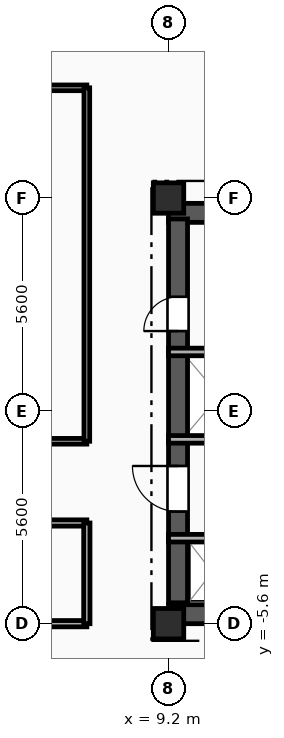
"""IFC4 building model, lengths in metres.
Left out: names, types, materials, properties, quantities, classifications, styles, units other than length and angle.
Written with IfcOpenShell. Run it as: python <this file> out.ifc"""

import sys

from ifc_helpers import new_model, si_unit, direction, frame, frame_2d, origin, origin_2d, place, context, subcontext, project, spatial, rectangle, extrude, element, fill, save


model = new_model("IFC4")
c1 = context("Model", 3, precision=1e-05, world=origin(), true_north=direction((0.0, 1.0)))
c2 = subcontext(c1, "Body", "Model", "MODEL_VIEW")
j1 = project(units=[si_unit("LENGTHUNIT", "METRE"), si_unit("PLANEANGLEUNIT", "RADIAN")], contexts=[c1])
p1 = place(None, origin())
s1 = spatial("IfcSite", under=j1, at=p1, CompositionType="ELEMENT")
p2 = place(p1, origin())
s2 = spatial("IfcBuilding", under=s1, at=p2, CompositionType="ELEMENT")
p3 = place(p2, frame((0.0, 0.0, 209.8)))
s3 = spatial("IfcBuildingStorey", under=s2, at=p3, CompositionType="ELEMENT", Elevation=209.8)
for number, where, z_axis, x_axis in (
    (1, (9.2, -5.6, 0.0), (0.0, 0.0, 1.0), (1.0, 0.0, 0.0)),
    (2, (9.2, 5.6, 0.0), (0.0, 0.0, 1.0), (1.0, 0.0, 0.0)),
):
    element("IfcColumn", number, at=place(p3, frame(where, z_axis=z_axis, x_axis=x_axis)), inside=s3, PredefinedType="COLUMN", context=c2, shape_type="SweptSolid", body=[
        extrude(rectangle(XDim=0.8, YDim=0.8, at=origin_2d()), origin(), (0.0, 0.0, 1.0), 3.35),
    ])
p4 = place(p3, frame((9.2, 5.21, 0.0), z_axis=(0.0, 0.0, 1.0), x_axis=(1.0, 0.0, 0.0)))
e3 = element("IfcWall", 3, at=p4, inside=s3, PredefinedType="SHEAR", context=c2, shape_type="SweptSolid", body=[
    extrude(rectangle(XDim=9.6, YDim=0.5, at=frame_2d((4.8, 0.0))), origin(), (0.0, 0.0, 1.0), 3.04),
])
p5 = place(p4, frame((6.95, 0.0, 0.0)))
e4 = element("IfcOpeningElement", 4, at=p5, cuts=e3, PredefinedType="OPENING", context=c2, shape_type="SweptSolid", body=[
    extrude(rectangle(XDim=1.1, YDim=2.15, at=frame_2d((0.55, 1.075))), frame((0.0, 0.26, 0.0), z_axis=(0.0, -1.0, 0.0), x_axis=(1.0, 0.0, 0.0)), (0.0, 0.0, 1.0), 0.52),
])
p6 = place(p4, frame((3.775, 0.0, 0.0)))
e5 = element("IfcOpeningElement", 5, at=p6, cuts=e3, PredefinedType="OPENING", context=c2, shape_type="SweptSolid", body=[
    extrude(rectangle(XDim=1.05, YDim=2.1, at=frame_2d((0.525, 1.05))), frame((0.0, 0.26, 0.0), z_axis=(0.0, -1.0, 0.0), x_axis=(1.0, 0.0, 0.0)), (0.0, 0.0, 1.0), 0.52),
])
p7 = place(p3, frame((9.2, -5.35, 0.0), z_axis=(0.0, 0.0, 1.0), x_axis=(1.0, 0.0, 0.0)))
e6 = element("IfcWall", 6, at=p7, inside=s3, PredefinedType="SHEAR", context=c2, shape_type="SweptSolid", body=[
    extrude(rectangle(XDim=9.6, YDim=0.5, at=frame_2d((4.8, 0.0))), origin(), (0.0, 0.0, 1.0), 3.04),
])
p8 = place(p7, frame((7.65, 0.0, 0.0)))
e7 = element("IfcOpeningElement", 7, at=p8, cuts=e6, PredefinedType="OPENING", context=c2, shape_type="SweptSolid", body=[
    extrude(rectangle(XDim=0.9, YDim=2.1, at=frame_2d((0.45, 1.05))), frame((0.0, 0.26, 0.0), z_axis=(0.0, -1.0, 0.0), x_axis=(1.0, 0.0, 0.0)), (0.0, 0.0, 1.0), 0.52),
])
p9 = place(p3, frame((9.45, -5.05, 0.0), z_axis=(0.0, 0.0, 1.0), x_axis=(0.0, 1.0, 0.0)))
e8 = element("IfcWall", 8, at=p9, inside=s3, PredefinedType="SHEAR", context=c2, shape_type="SweptSolid", body=[
    extrude(rectangle(XDim=10.1, YDim=0.5, at=frame_2d((5.05, 0.0))), origin(), (0.0, 0.0, 1.0), 3.04),
])
p10 = place(p9, frame((7.15, 0.0, 0.0)))
e9 = element("IfcOpeningElement", 9, at=p10, cuts=e8, PredefinedType="OPENING", context=c2, shape_type="SweptSolid", body=[
    extrude(rectangle(XDim=0.9, YDim=2.1, at=frame_2d((0.45, 1.05))), frame((0.0, 0.26, 0.0), z_axis=(0.0, -1.0, 0.0), x_axis=(1.0, 0.0, 0.0)), (0.0, 0.0, 1.0), 0.52),
])
p11 = place(p9, frame((2.4, 0.0, 0.0)))
e10 = element("IfcOpeningElement", 10, at=p11, cuts=e8, PredefinedType="OPENING", context=c2, shape_type="SweptSolid", body=[
    extrude(rectangle(XDim=1.2, YDim=2.15, at=frame_2d((0.6, 1.075))), frame((0.0, 0.26, 0.0), z_axis=(0.0, -1.0, 0.0), x_axis=(1.0, 0.0, 0.0)), (0.0, 0.0, 1.0), 0.52),
])
p12 = place(p3, frame((9.2, -3.35, 0.0), z_axis=(0.0, 0.0, 1.0), x_axis=(1.0, 0.0, 0.0)))
e11 = element("IfcWall", 11, at=p12, inside=s3, PredefinedType="PARTITIONING", context=c2, shape_type="SweptSolid", body=[
    extrude(rectangle(XDim=1.88, YDim=0.2, at=frame_2d((0.94, 0.0))), origin(), (0.0, 0.0, 1.0), 2.755),
])
p13 = place(p3, frame((11.46, -0.75, 0.0), z_axis=(0.0, 0.0, 1.0), x_axis=(-1.0, 0.0, 0.0)))
e12 = element("IfcWall", 12, at=p13, inside=s3, PredefinedType="PARTITIONING", context=c2, shape_type="SweptSolid", body=[
    extrude(rectangle(XDim=2.26, YDim=0.2, at=frame_2d((1.13, 0.0))), origin(), (0.0, 0.0, 1.0), 3.04),
])
p14 = place(p3, frame((7.05, 8.5, 0.0), z_axis=(0.0, 0.0, 1.0), x_axis=(-1.0, 0.0, 0.0)))
e13 = element("IfcWall", 13, at=p14, inside=s3, PredefinedType="PARTITIONING", context=c2, shape_type="SweptSolid", body=[
    extrude(rectangle(XDim=7.05, YDim=0.15, at=frame_2d((3.525, 0.0))), origin(), (0.0, 0.0, 1.0), 3.04),
])
p15 = place(p3, frame((0.0, -5.6, 0.0), z_axis=(0.0, 0.0, 1.0), x_axis=(1.0, 0.0, 0.0)))
e14 = element("IfcWall", 14, at=p15, inside=s3, PredefinedType="PARTITIONING", context=c2, shape_type="SweptSolid", body=[
    extrude(rectangle(XDim=7.05, YDim=0.165, at=frame_2d((3.525, 0.0))), origin(), (0.0, 0.0, 1.0), 2.525),
])
p16 = place(p3, frame((-7.05, -0.8, 0.0), z_axis=(0.0, 0.0, 1.0), x_axis=(1.0, 0.0, 0.0)))
e15 = element("IfcWall", 15, at=p16, inside=s3, PredefinedType="PARTITIONING", context=c2, shape_type="SweptSolid", body=[
    extrude(rectangle(XDim=14.1, YDim=0.15, at=frame_2d((7.05, 0.0))), origin(), (0.0, 0.0, 1.0), 3.04),
])
p17 = place(p16, frame((6.525, 0.0, 0.0)))
e16 = element("IfcOpeningElement", 16, at=p17, cuts=e15, PredefinedType="OPENING", context=c2, shape_type="SweptSolid", body=[
    extrude(rectangle(XDim=1.05, YDim=2.15, at=frame_2d((0.525, 1.075))), frame((0.0, 0.085, 0.0), z_axis=(0.0, -1.0, 0.0), x_axis=(1.0, 0.0, 0.0)), (0.0, 0.0, 1.0), 0.17),
])
p18 = place(p3, frame((7.05, -2.95, 0.0), z_axis=(0.0, 0.0, 1.0), x_axis=(-1.0, 0.0, 0.0)))
e17 = element("IfcWall", 17, at=p18, inside=s3, PredefinedType="PARTITIONING", context=c2, shape_type="SweptSolid", body=[
    extrude(rectangle(XDim=14.1, YDim=0.165, at=frame_2d((7.05, 0.0))), origin(), (0.0, 0.0, 1.0), 3.04),
])
p19 = place(p18, frame((6.475, 0.0, 0.0)))
e18 = element("IfcOpeningElement", 18, at=p19, cuts=e17, PredefinedType="OPENING", context=c2, shape_type="SweptSolid", body=[
    extrude(rectangle(XDim=1.15, YDim=2.15, at=frame_2d((0.575, 1.075))), frame((0.0, 0.093, 0.0), z_axis=(0.0, -1.0, 0.0), x_axis=(1.0, 0.0, 0.0)), (0.0, 0.0, 1.0), 0.185),
])
p20 = place(p3, frame((7.05, -0.8, 0.0), z_axis=(0.0, 0.0, 1.0), x_axis=(0.0, 1.0, 0.0)))
e19 = element("IfcWall", 19, at=p20, inside=s3, PredefinedType="PARTITIONING", context=c2, shape_type="SweptSolid", body=[
    extrude(rectangle(XDim=9.3, YDim=0.15, at=frame_2d((4.65, 0.0))), origin(), (0.0, 0.0, 1.0), 3.04),
])
p21 = place(p3, frame((7.05, -5.6, 0.0), z_axis=(0.0, 0.0, 1.0), x_axis=(0.0, 1.0, 0.0)))
e20 = element("IfcWall", 20, at=p21, inside=s3, PredefinedType="PARTITIONING", context=c2, shape_type="SweptSolid", body=[
    extrude(rectangle(XDim=2.65, YDim=0.165, at=frame_2d((1.325, 0.0))), origin(), (0.0, 0.0, 1.0), 3.04),
])
p22 = place(p3, frame((9.2, 1.55, 0.0), z_axis=(0.0, 0.0, 1.0), x_axis=(1.0, 0.0, 0.0)))
e21 = element("IfcWall", 21, at=p22, inside=s3, PredefinedType="PARTITIONING", context=c2, shape_type="SweptSolid", body=[
    extrude(rectangle(XDim=5.82, YDim=0.2, at=frame_2d((2.91, 0.0))), origin(), (0.0, 0.0, 1.0), 3.04),
])
p23 = place(p10, origin())
e22 = element("IfcDoor", 22, at=p23, inside=s3, OperationType="SINGLE_SWING_LEFT", PredefinedType="DOOR", context=c2, shape_type="SweptSolid", body=[
    extrude(rectangle(XDim=0.9, YDim=2.1, at=frame_2d((0.45, 1.05))), frame((0.0, 0.025, 0.0), z_axis=(0.0, -1.0, 0.0), x_axis=(1.0, 0.0, 0.0)), (0.0, 0.0, 1.0), 0.05),
])
fill(e9, e22)
p24 = place(p11, origin())
e23 = element("IfcDoor", 23, at=p24, inside=s3, OperationType="SINGLE_SWING_RIGHT", PredefinedType="DOOR", context=c2, shape_type="SweptSolid", body=[
    extrude(rectangle(XDim=1.2, YDim=2.15, at=frame_2d((0.6, 1.075))), frame((0.0, 0.025, 0.0), z_axis=(0.0, -1.0, 0.0), x_axis=(1.0, 0.0, 0.0)), (0.0, 0.0, 1.0), 0.05),
])
fill(e10, e23)
save(model, sys.argv[1])
